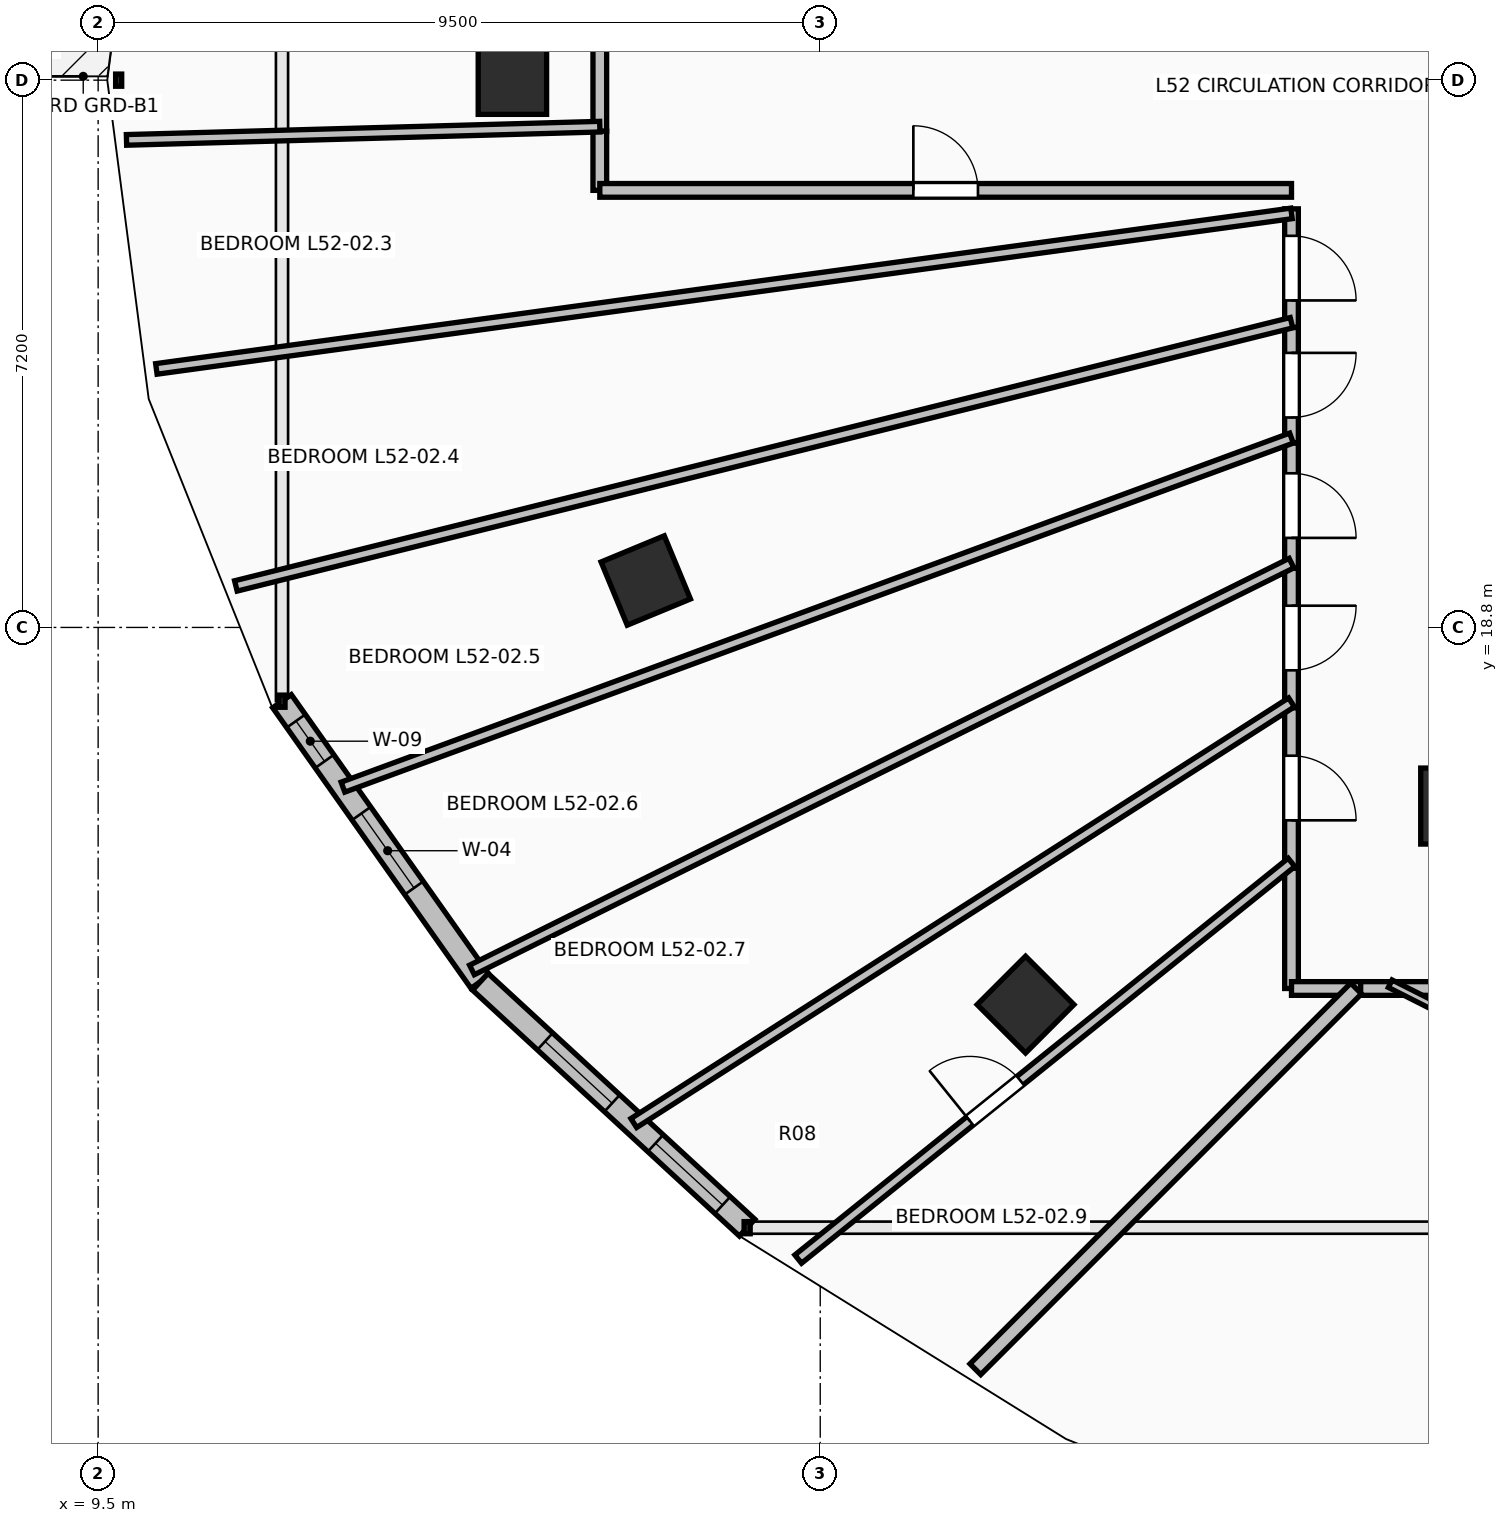
"""IFC4 building model, lengths in metres.
Left out: names, types, materials, properties, quantities, classifications, styles, units other than length and angle.
Written with IfcOpenShell. Run it as: python <this file> out.ifc"""

import sys

from ifc_helpers import new_model, si_unit, direction, frame, frame_2d, origin, origin_2d, place, context, subcontext, project, spatial, rectangle, extrude, element, fill, save


model = new_model("IFC4")
c1 = context("Model", 3, precision=1e-05, world=origin(), true_north=direction((0.0, 1.0)))
c2 = subcontext(c1, "Body", "Model", "MODEL_VIEW")
j1 = project(units=[si_unit("LENGTHUNIT", "METRE"), si_unit("PLANEANGLEUNIT", "RADIAN")], contexts=[c1])
p1 = place(None, origin())
s1 = spatial("IfcSite", under=j1, at=p1, CompositionType="ELEMENT")
p2 = place(p1, origin())
s2 = spatial("IfcBuilding", under=s1, at=p2, CompositionType="ELEMENT")
p3 = place(p2, frame((0.0, 0.0, 193.1)))
s3 = spatial("IfcBuildingStorey", under=s2, at=p3, CompositionType="ELEMENT", Elevation=193.1)
for number, where, z_axis, x_axis in (
    (1, (14.95, 26.0, 0.0), (0.0, 0.0, 1.0), (-1.0, 0.0, 0.0)),
    (2, (16.705, 19.418, 0.0), (0.0, 0.0, 1.0), (-0.924, -0.383, 0.0)),
    (3, (21.701, 13.838, 0.0), (0.0, 0.0, 1.0), (-0.707, -0.707, 0.0)),
):
    element("IfcColumn", number, at=place(p3, frame(where, z_axis=z_axis, x_axis=x_axis)), inside=s3, PredefinedType="COLUMN", context=c2, shape_type="SweptSolid", body=[
        extrude(rectangle(XDim=0.9, YDim=0.9, at=origin_2d()), origin(), (0.0, 0.0, 1.0), 3.5),
    ])
p4 = place(p3, frame((27.25, 16.45, 0.0), z_axis=(0.0, 0.0, 1.0), x_axis=(1.0, 0.0, 0.0)))
e4 = element("IfcColumn", 4, at=p4, inside=s3, PredefinedType="PILASTER", context=c2, shape_type="SweptSolid", body=[
    extrude(rectangle(XDim=0.7, YDim=1.0, at=origin_2d()), origin(), (0.0, 0.0, 1.0), 3.5),
])
p5 = place(p3, frame((11.919, 17.83, 0.0), z_axis=(0.0, 0.0, 1.0), x_axis=(0.577168747264, -0.81662490605, 0.0)))
e5 = element("IfcWall", 5, at=p5, inside=s3, PredefinedType="STANDARD", context=c2, shape_type="SweptSolid", body=[
    extrude(rectangle(XDim=4.52, YDim=0.3, at=frame_2d((2.26, 0.0))), origin(), (0.0, 0.0, 1.0), 3.24),
])
p6 = place(p5, frame((0.32, 0.0, 0.85)))
e6 = element("IfcOpeningElement", 6, at=p6, cuts=e5, PredefinedType="OPENING", context=c2, shape_type="SweptSolid", body=[
    extrude(rectangle(XDim=0.65, YDim=1.8, at=frame_2d((0.325, 0.9))), frame((0.0, 0.165, 0.0), z_axis=(0.0, -1.0, 0.0), x_axis=(1.0, 0.0, 0.0)), (0.0, 0.0, 1.0), 0.33),
])
p7 = place(p5, frame((1.809, 0.0, 0.85)))
e7 = element("IfcOpeningElement", 7, at=p7, cuts=e5, PredefinedType="OPENING", context=c2, shape_type="SweptSolid", body=[
    extrude(rectangle(XDim=1.2, YDim=1.95, at=frame_2d((0.6, 0.975))), frame((0.0, 0.165, 0.0), z_axis=(0.0, -1.0, 0.0), x_axis=(1.0, 0.0, 0.0)), (0.0, 0.0, 1.0), 0.33),
])
p8 = place(p3, frame((14.528, 14.139, 0.0), z_axis=(0.0, 0.0, 1.0), x_axis=(0.735359993374, -0.677676678177, 0.0)))
e8 = element("IfcWall", 8, at=p8, inside=s3, PredefinedType="STANDARD", context=c2, shape_type="SweptSolid", body=[
    extrude(rectangle(XDim=4.774, YDim=0.3, at=frame_2d((2.387, 0.0))), origin(), (0.0, 0.0, 1.0), 3.24),
])
p9 = place(p8, frame((1.158, 0.0, 0.85)))
e9 = element("IfcOpeningElement", 9, at=p9, cuts=e8, PredefinedType="OPENING", context=c2, shape_type="SweptSolid", body=[
    extrude(rectangle(XDim=1.2, YDim=1.95, at=frame_2d((0.6, 0.975))), frame((0.0, 0.165, 0.0), z_axis=(0.0, -1.0, 0.0), x_axis=(1.0, 0.0, 0.0)), (0.0, 0.0, 1.0), 0.33),
])
p10 = place(p8, frame((3.135, 0.0, 0.85)))
e10 = element("IfcOpeningElement", 10, at=p10, cuts=e8, PredefinedType="OPENING", context=c2, shape_type="SweptSolid", body=[
    extrude(rectangle(XDim=1.2, YDim=1.95, at=frame_2d((0.6, 0.975))), frame((0.0, 0.165, 0.0), z_axis=(0.0, -1.0, 0.0), x_axis=(1.0, 0.0, 0.0)), (0.0, 0.0, 1.0), 0.33),
])
p11 = place(p3, frame((16.1, 27.25, 0.0), z_axis=(0.0, 0.0, 1.0), x_axis=(0.0, -1.0, 0.0)))
e11 = element("IfcWall", 11, at=p11, inside=s3, PredefinedType="PARTITIONING", context=c2, shape_type="SweptSolid", body=[
    extrude(rectangle(XDim=1.922, YDim=0.18, at=frame_2d((0.961, 0.0))), origin(), (0.0, 0.0, 1.0), 2.432),
])
p12 = place(p3, frame((16.1, 25.328, 0.0), z_axis=(0.0, 0.0, 1.0), x_axis=(0.0, -1.0, 0.0)))
e12 = element("IfcWall", 12, at=p12, inside=s3, PredefinedType="PARTITIONING", context=c2, shape_type="SweptSolid", body=[
    extrude(rectangle(XDim=0.778, YDim=0.18, at=frame_2d((0.389, 0.0))), origin(), (0.0, 0.0, 1.0), 3.24),
])
p13 = place(p3, frame((16.1, 24.55, 0.0), z_axis=(0.0, 0.0, 1.0), x_axis=(1.0, 0.0, 0.0)))
e13 = element("IfcWall", 13, at=p13, inside=s3, PredefinedType="PARTITIONING", context=c2, shape_type="SweptSolid", body=[
    extrude(rectangle(XDim=9.1, YDim=0.18, at=frame_2d((4.55, 0.0))), origin(), (0.0, 0.0, 1.0), 2.922),
])
p14 = place(p13, frame((4.125, 0.0, 0.0)))
e14 = element("IfcOpeningElement", 14, at=p14, cuts=e13, PredefinedType="OPENING", context=c2, shape_type="SweptSolid", body=[
    extrude(rectangle(XDim=0.85, YDim=2.1, at=frame_2d((0.425, 1.05))), frame((0.0, 0.105, 0.0), z_axis=(0.0, -1.0, 0.0), x_axis=(1.0, 0.0, 0.0)), (0.0, 0.0, 1.0), 0.21),
])
p15 = place(p3, frame((25.2, 24.307, 0.0), z_axis=(0.0, 0.0, 1.0), x_axis=(0.0, -1.0, 0.0)))
e15 = element("IfcWall", 15, at=p15, inside=s3, PredefinedType="PARTITIONING", context=c2, shape_type="SweptSolid", body=[
    extrude(rectangle(XDim=1.56, YDim=0.18, at=frame_2d((0.78, 0.0))), origin(), (0.0, 0.0, 1.0), 3.24),
])
p16 = place(p15, frame((0.355, 0.0, 0.0)))
e16 = element("IfcOpeningElement", 16, at=p16, cuts=e15, PredefinedType="OPENING", context=c2, shape_type="SweptSolid", body=[
    extrude(rectangle(XDim=0.85, YDim=2.1, at=frame_2d((0.425, 1.05))), frame((0.0, 0.105, 0.0), z_axis=(0.0, -1.0, 0.0), x_axis=(1.0, 0.0, 0.0)), (0.0, 0.0, 1.0), 0.21),
])
p17 = place(p3, frame((25.2, 22.747, 0.0), z_axis=(0.0, 0.0, 1.0), x_axis=(0.0, -1.0, 0.0)))
e17 = element("IfcWall", 17, at=p17, inside=s3, PredefinedType="PARTITIONING", context=c2, shape_type="SweptSolid", body=[
    extrude(rectangle(XDim=1.52, YDim=0.18, at=frame_2d((0.76, 0.0))), origin(), (0.0, 0.0, 1.0), 3.24),
])
p18 = place(p17, frame((0.335, 0.0, 0.0)))
e18 = element("IfcOpeningElement", 18, at=p18, cuts=e17, PredefinedType="OPENING", context=c2, shape_type="SweptSolid", body=[
    extrude(rectangle(XDim=0.85, YDim=2.1, at=frame_2d((0.425, 1.05))), frame((0.0, 0.105, 0.0), z_axis=(0.0, -1.0, 0.0), x_axis=(1.0, 0.0, 0.0)), (0.0, 0.0, 1.0), 0.21),
])
p19 = place(p3, frame((25.2, 21.227, 0.0), z_axis=(0.0, 0.0, 1.0), x_axis=(0.0, -1.0, 0.0)))
e19 = element("IfcWall", 19, at=p19, inside=s3, PredefinedType="PARTITIONING", context=c2, shape_type="SweptSolid", body=[
    extrude(rectangle(XDim=1.648, YDim=0.18, at=frame_2d((0.824, 0.0))), origin(), (0.0, 0.0, 1.0), 3.24),
])
p20 = place(p19, frame((0.399, 0.0, 0.0)))
e20 = element("IfcOpeningElement", 20, at=p20, cuts=e19, PredefinedType="OPENING", context=c2, shape_type="SweptSolid", body=[
    extrude(rectangle(XDim=0.85, YDim=2.1, at=frame_2d((0.425, 1.05))), frame((0.0, 0.105, 0.0), z_axis=(0.0, -1.0, 0.0), x_axis=(1.0, 0.0, 0.0)), (0.0, 0.0, 1.0), 0.21),
])
p21 = place(p3, frame((25.2, 19.579, 0.0), z_axis=(0.0, 0.0, 1.0), x_axis=(0.0, -1.0, 0.0)))
e21 = element("IfcWall", 21, at=p21, inside=s3, PredefinedType="PARTITIONING", context=c2, shape_type="SweptSolid", body=[
    extrude(rectangle(XDim=1.836, YDim=0.18, at=frame_2d((0.918, 0.0))), origin(), (0.0, 0.0, 1.0), 3.24),
])
p22 = place(p21, frame((0.493, 0.0, 0.0)))
e22 = element("IfcOpeningElement", 22, at=p22, cuts=e21, PredefinedType="OPENING", context=c2, shape_type="SweptSolid", body=[
    extrude(rectangle(XDim=0.85, YDim=2.1, at=frame_2d((0.425, 1.05))), frame((0.0, 0.105, 0.0), z_axis=(0.0, -1.0, 0.0), x_axis=(1.0, 0.0, 0.0)), (0.0, 0.0, 1.0), 0.21),
])
p23 = place(p3, frame((25.2, 17.743, 0.0), z_axis=(0.0, 0.0, 1.0), x_axis=(0.0, -1.0, 0.0)))
e23 = element("IfcWall", 23, at=p23, inside=s3, PredefinedType="PARTITIONING", context=c2, shape_type="SweptSolid", body=[
    extrude(rectangle(XDim=2.111, YDim=0.18, at=frame_2d((1.055, 0.0))), origin(), (0.0, 0.0, 1.0), 2.432),
])
p24 = place(p23, frame((0.631, 0.0, 0.0)))
e24 = element("IfcOpeningElement", 24, at=p24, cuts=e23, PredefinedType="OPENING", context=c2, shape_type="SweptSolid", body=[
    extrude(rectangle(XDim=0.85, YDim=2.1, at=frame_2d((0.425, 1.05))), frame((0.0, 0.105, 0.0), z_axis=(0.0, -1.0, 0.0), x_axis=(1.0, 0.0, 0.0)), (0.0, 0.0, 1.0), 0.21),
])
p25 = place(p3, frame((25.2, 15.632, 0.0), z_axis=(0.0, 0.0, 1.0), x_axis=(0.0, -1.0, 0.0)))
e25 = element("IfcWall", 25, at=p25, inside=s3, PredefinedType="PARTITIONING", context=c2, shape_type="SweptSolid", body=[
    extrude(rectangle(XDim=1.582, YDim=0.18, at=frame_2d((0.791, 0.0))), origin(), (0.0, 0.0, 1.0), 2.432),
])
p26 = place(p3, frame((25.2, 14.05, 0.0), z_axis=(0.0, 0.0, 1.0), x_axis=(1.0, 0.0, 0.0)))
e26 = element("IfcWall", 26, at=p26, inside=s3, PredefinedType="PARTITIONING", context=c2, shape_type="SweptSolid", body=[
    extrude(rectangle(XDim=0.91, YDim=0.18, at=frame_2d((0.455, 0.0))), origin(), (0.0, 0.0, 1.0), 2.922),
])
p27 = place(p3, frame((26.11, 14.05, 0.0), z_axis=(0.0, 0.0, 1.0), x_axis=(1.0, 0.0, 0.0)))
e27 = element("IfcWall", 27, at=p27, inside=s3, PredefinedType="PARTITIONING", context=c2, shape_type="SweptSolid", body=[
    extrude(rectangle(XDim=0.647, YDim=0.18, at=frame_2d((0.323, 0.0))), origin(), (0.0, 0.0, 1.0), 3.24),
])
p28 = place(p3, frame((26.617, 14.05, 0.0), z_axis=(0.0, 0.0, 1.0), x_axis=(1.0, 0.0, 0.0)))
e28 = element("IfcWall", 28, at=p28, inside=s3, PredefinedType="PARTITIONING", context=c2, shape_type="SweptSolid", body=[
    extrude(rectangle(XDim=5.834, YDim=0.18, at=frame_2d((2.917, 0.0))), origin(), (0.0, 0.0, 1.0), 2.432),
])
p29 = place(p3, frame((9.873, 25.214, 0.0), z_axis=(0.0, 0.0, 1.0), x_axis=(0.999610603939, 0.027904130401, 0.0)))
e29 = element("IfcWall", 29, at=p29, inside=s3, PredefinedType="PARTITIONING", context=c2, shape_type="SweptSolid", body=[
    extrude(rectangle(XDim=6.229, YDim=0.14, at=frame_2d((3.115, 0.0))), origin(), (0.0, 0.0, 1.0), 2.774),
])
p30 = place(p3, frame((10.266, 22.201, 0.0), z_axis=(0.0, 0.0, 1.0), x_axis=(0.990743725495, 0.135745609106, 0.0)))
e30 = element("IfcWall", 30, at=p30, inside=s3, PredefinedType="PARTITIONING", context=c2, shape_type="SweptSolid", body=[
    extrude(rectangle(XDim=15.073, YDim=0.14, at=frame_2d((7.537, 0.0))), origin(), (0.0, 0.0, 1.0), 2.774),
])
p31 = place(p3, frame((11.312, 19.346, 0.0), z_axis=(0.0, 0.0, 1.0), x_axis=(0.970287811835, 0.241953636475, 0.0)))
e31 = element("IfcWall", 31, at=p31, inside=s3, PredefinedType="PARTITIONING", context=c2, shape_type="SweptSolid", body=[
    extrude(rectangle(XDim=14.313, YDim=0.14, at=frame_2d((7.157, 0.0))), origin(), (0.0, 0.0, 1.0), 2.774),
])
p32 = place(p3, frame((12.721, 16.699, 0.0), z_axis=(0.0, 0.0, 1.0), x_axis=(0.938476898763, 0.34534201958, 0.0)))
e32 = element("IfcWall", 32, at=p32, inside=s3, PredefinedType="PARTITIONING", context=c2, shape_type="SweptSolid", body=[
    extrude(rectangle(XDim=13.297, YDim=0.14, at=frame_2d((6.648, 0.0))), origin(), (0.0, 0.0, 1.0), 2.432),
])
p33 = place(p3, frame((14.418, 14.294, 0.0), z_axis=(0.0, 0.0, 1.0), x_axis=(0.895717443483, 0.444623730182, 0.0)))
e33 = element("IfcWall", 33, at=p33, inside=s3, PredefinedType="PARTITIONING", context=c2, shape_type="SweptSolid", body=[
    extrude(rectangle(XDim=12.037, YDim=0.14, at=frame_2d((6.019, 0.0))), origin(), (0.0, 0.0, 1.0), 2.432),
])
p34 = place(p3, frame((16.547, 12.28, 0.0), z_axis=(0.0, 0.0, 1.0), x_axis=(0.842442736758, 0.53878589002, 0.0)))
e34 = element("IfcWall", 34, at=p34, inside=s3, PredefinedType="PARTITIONING", context=c2, shape_type="SweptSolid", body=[
    extrude(rectangle(XDim=10.271, YDim=0.14, at=frame_2d((5.136, 0.0))), origin(), (0.0, 0.0, 1.0), 2.432),
])
p35 = place(p3, frame((18.71, 10.49, 0.0), z_axis=(0.0, 0.0, 1.0), x_axis=(0.779284718529, 0.626670030771, 0.0)))
e35 = element("IfcWall", 35, at=p35, inside=s3, PredefinedType="PARTITIONING", context=c2, shape_type="SweptSolid", body=[
    extrude(rectangle(XDim=8.328, YDim=0.14, at=frame_2d((4.164, 0.0))), origin(), (0.0, 0.0, 1.0), 2.432),
])
p36 = place(p35, frame((2.899, 0.0, 0.0)))
e36 = element("IfcOpeningElement", 36, at=p36, cuts=e35, PredefinedType="OPENING", context=c2, shape_type="SweptSolid", body=[
    extrude(rectangle(XDim=0.85, YDim=2.1, at=frame_2d((0.425, 1.05))), frame((0.0, 0.085, 0.0), z_axis=(0.0, -1.0, 0.0), x_axis=(1.0, 0.0, 0.0)), (0.0, 0.0, 1.0), 0.17),
])
p37 = place(p3, frame((21.041, 9.041, 0.0), z_axis=(0.0, 0.0, 1.0), x_axis=(0.707106781187, 0.707106781187, 0.0)))
e37 = element("IfcWall", 37, at=p37, inside=s3, PredefinedType="PARTITIONING", context=c2, shape_type="SweptSolid", body=[
    extrude(rectangle(XDim=7.084, YDim=0.2, at=frame_2d((3.542, 0.0))), origin(), (0.0, 0.0, 1.0), 2.774),
])
p38 = place(p3, frame((30.533, 12.075, 0.0), z_axis=(0.0, 0.0, 1.0), x_axis=(-0.892550333972, 0.450947781153, 0.0)))
e38 = element("IfcWall", 38, at=p38, inside=s3, PredefinedType="PARTITIONING", context=c2, shape_type="SweptSolid", body=[
    extrude(rectangle(XDim=4.52, YDim=0.11, at=frame_2d((2.26, 0.0))), origin(), (0.0, 0.0, 1.0), 2.432),
])
p39 = place(p38, frame((1.835, 0.0, 0.0)))
e39 = element("IfcOpeningElement", 39, at=p39, cuts=e38, PredefinedType="OPENING", context=c2, shape_type="SweptSolid", body=[
    extrude(rectangle(XDim=0.85, YDim=2.1, at=frame_2d((0.425, 1.05))), frame((0.0, 0.07, 0.0), z_axis=(0.0, -1.0, 0.0), x_axis=(1.0, 0.0, 0.0)), (0.0, 0.0, 1.0), 0.14),
])
p40 = place(p6, origin())
e40 = element("IfcWindow", 40, at=p40, inside=s3, PartitioningType="SINGLE_PANEL", PredefinedType="WINDOW", context=c2, shape_type="SweptSolid", body=[
    extrude(rectangle(XDim=0.65, YDim=1.8, at=frame_2d((0.325, 0.9))), frame((0.0, 0.03, 0.0), z_axis=(0.0, -1.0, 0.0), x_axis=(1.0, 0.0, 0.0)), (0.0, 0.0, 1.0), 0.06),
])
fill(e6, e40)
p41 = place(p7, origin())
e41 = element("IfcWindow", 41, at=p41, inside=s3, PartitioningType="SINGLE_PANEL", PredefinedType="WINDOW", context=c2, shape_type="SweptSolid", body=[
    extrude(rectangle(XDim=1.2, YDim=1.95, at=frame_2d((0.6, 0.975))), frame((0.0, 0.03, 0.0), z_axis=(0.0, -1.0, 0.0), x_axis=(1.0, 0.0, 0.0)), (0.0, 0.0, 1.0), 0.06),
])
fill(e7, e41)
p42 = place(p9, origin())
e42 = element("IfcWindow", 42, at=p42, inside=s3, PartitioningType="SINGLE_PANEL", PredefinedType="WINDOW", context=c2, shape_type="SweptSolid", body=[
    extrude(rectangle(XDim=1.2, YDim=1.95, at=frame_2d((0.6, 0.975))), frame((0.0, 0.03, 0.0), z_axis=(0.0, -1.0, 0.0), x_axis=(1.0, 0.0, 0.0)), (0.0, 0.0, 1.0), 0.06),
])
fill(e9, e42)
p43 = place(p10, origin())
e43 = element("IfcWindow", 43, at=p43, inside=s3, PartitioningType="SINGLE_PANEL", PredefinedType="WINDOW", context=c2, shape_type="SweptSolid", body=[
    extrude(rectangle(XDim=1.2, YDim=1.95, at=frame_2d((0.6, 0.975))), frame((0.0, 0.03, 0.0), z_axis=(0.0, -1.0, 0.0), x_axis=(1.0, 0.0, 0.0)), (0.0, 0.0, 1.0), 0.06),
])
fill(e10, e43)
p44 = place(p14, origin())
e44 = element("IfcDoor", 44, at=p44, inside=s3, OperationType="SINGLE_SWING_LEFT", PredefinedType="DOOR", context=c2, shape_type="SweptSolid", body=[
    extrude(rectangle(XDim=0.85, YDim=2.1, at=frame_2d((0.425, 1.05))), frame((0.0, 0.025, 0.0), z_axis=(0.0, -1.0, 0.0), x_axis=(1.0, 0.0, 0.0)), (0.0, 0.0, 1.0), 0.05),
])
fill(e14, e44)
p45 = place(p16, origin())
e45 = element("IfcDoor", 45, at=p45, inside=s3, OperationType="SINGLE_SWING_RIGHT", PredefinedType="DOOR", context=c2, shape_type="SweptSolid", body=[
    extrude(rectangle(XDim=0.85, YDim=2.1, at=frame_2d((0.425, 1.05))), frame((0.0, 0.025, 0.0), z_axis=(0.0, -1.0, 0.0), x_axis=(1.0, 0.0, 0.0)), (0.0, 0.0, 1.0), 0.05),
])
fill(e16, e45)
p46 = place(p18, origin())
e46 = element("IfcDoor", 46, at=p46, inside=s3, OperationType="SINGLE_SWING_LEFT", PredefinedType="DOOR", context=c2, shape_type="SweptSolid", body=[
    extrude(rectangle(XDim=0.85, YDim=2.1, at=frame_2d((0.425, 1.05))), frame((0.0, 0.025, 0.0), z_axis=(0.0, -1.0, 0.0), x_axis=(1.0, 0.0, 0.0)), (0.0, 0.0, 1.0), 0.05),
])
fill(e18, e46)
p47 = place(p20, origin())
e47 = element("IfcDoor", 47, at=p47, inside=s3, OperationType="SINGLE_SWING_RIGHT", PredefinedType="DOOR", context=c2, shape_type="SweptSolid", body=[
    extrude(rectangle(XDim=0.85, YDim=2.1, at=frame_2d((0.425, 1.05))), frame((0.0, 0.025, 0.0), z_axis=(0.0, -1.0, 0.0), x_axis=(1.0, 0.0, 0.0)), (0.0, 0.0, 1.0), 0.05),
])
fill(e20, e47)
p48 = place(p22, origin())
e48 = element("IfcDoor", 48, at=p48, inside=s3, OperationType="SINGLE_SWING_LEFT", PredefinedType="DOOR", context=c2, shape_type="SweptSolid", body=[
    extrude(rectangle(XDim=0.85, YDim=2.1, at=frame_2d((0.425, 1.05))), frame((0.0, 0.025, 0.0), z_axis=(0.0, -1.0, 0.0), x_axis=(1.0, 0.0, 0.0)), (0.0, 0.0, 1.0), 0.05),
])
fill(e22, e48)
p49 = place(p24, origin())
e49 = element("IfcDoor", 49, at=p49, inside=s3, OperationType="SINGLE_SWING_RIGHT", PredefinedType="DOOR", context=c2, shape_type="SweptSolid", body=[
    extrude(rectangle(XDim=0.85, YDim=2.1, at=frame_2d((0.425, 1.05))), frame((0.0, 0.025, 0.0), z_axis=(0.0, -1.0, 0.0), x_axis=(1.0, 0.0, 0.0)), (0.0, 0.0, 1.0), 0.05),
])
fill(e24, e49)
p50 = place(p36, origin())
e50 = element("IfcDoor", 50, at=p50, inside=s3, OperationType="SINGLE_SWING_LEFT", PredefinedType="DOOR", context=c2, shape_type="SweptSolid", body=[
    extrude(rectangle(XDim=0.85, YDim=2.1, at=frame_2d((0.425, 1.05))), frame((0.0, 0.025, 0.0), z_axis=(0.0, -1.0, 0.0), x_axis=(1.0, 0.0, 0.0)), (0.0, 0.0, 1.0), 0.05),
])
fill(e36, e50)
save(model, sys.argv[1])
